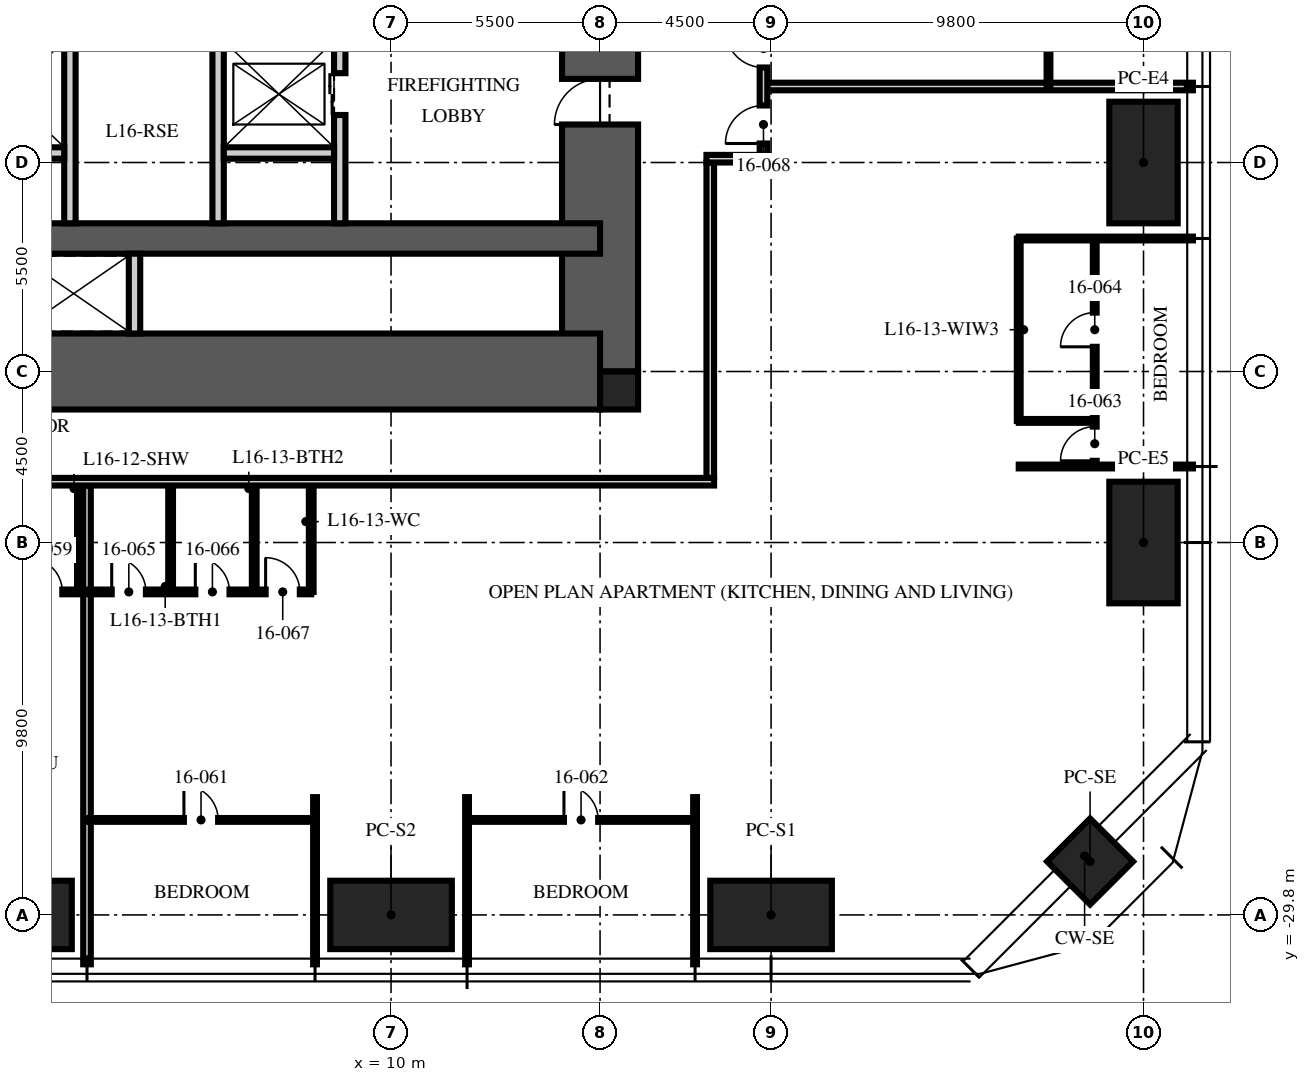
"""IFC4 building model, lengths in metres.
Left out: names, types, materials, properties, quantities, classifications, styles, units other than length and angle.
Written with IfcOpenShell. Run it as: python <this file> out.ifc"""

import sys

from ifc_helpers import new_model, si_unit, direction, frame, frame_2d, origin, origin_2d, place, context, subcontext, project, spatial, rectangle, hollow_rectangle, extrude, element, fill, save


model = new_model("IFC4")
c1 = context("Model", 3, precision=1e-05, world=origin(), true_north=direction((0.0, 1.0)))
c2 = subcontext(c1, "Body", "Model", "MODEL_VIEW")
j1 = project(units=[si_unit("LENGTHUNIT", "METRE"), si_unit("PLANEANGLEUNIT", "RADIAN")], contexts=[c1])
p1 = place(None, origin())
s1 = spatial("IfcSite", under=j1, at=p1, CompositionType="ELEMENT")
p2 = place(p1, origin())
s2 = spatial("IfcBuilding", under=s1, at=p2, CompositionType="ELEMENT")
p3 = place(p2, frame((0.0, 0.0, 66.0)))
s3 = spatial("IfcBuildingStorey", under=s2, at=p3, CompositionType="ELEMENT", Elevation=66.0)
p4 = place(p3, frame((15.5, -15.5, -0.25), z_axis=(0.0, 0.0, 1.0), x_axis=(0.0, 1.0, 0.0)))
e1 = element("IfcWall", 1, at=p4, inside=s3, PredefinedType="SHEAR", context=c2, shape_type="SweptSolid", body=[
    extrude(rectangle(XDim=31.0, YDim=2.0, at=frame_2d((15.5, 0.0))), origin(), (0.0, 0.0, 1.0), 3.75),
])
p5 = place(p4, frame((6.5, 0.0, 0.25)))
e2 = element("IfcOpeningElement", 2, at=p5, cuts=e1, PredefinedType="OPENING", context=c2, shape_type="SweptSolid", body=[
    extrude(rectangle(XDim=1.2, YDim=2.1, at=frame_2d((0.6, 1.05))), frame((0.0, 1.01, 0.0), z_axis=(0.0, -1.0, 0.0), x_axis=(1.0, 0.0, 0.0)), (0.0, 0.0, 1.0), 2.02),
])
p6 = place(p4, frame((23.0, 0.0, 0.25)))
e3 = element("IfcOpeningElement", 3, at=p6, cuts=e1, PredefinedType="OPENING", context=c2, shape_type="SweptSolid", body=[
    extrude(rectangle(XDim=1.8, YDim=2.1, at=frame_2d((0.9, 1.05))), frame((0.0, 1.01, 0.0), z_axis=(0.0, -1.0, 0.0), x_axis=(1.0, 0.0, 0.0)), (0.0, 0.0, 1.0), 2.02),
])
p7 = place(p3, frame((-15.5, -15.5, -0.25), z_axis=(0.0, 0.0, 1.0), x_axis=(1.0, 0.0, 0.0)))
e4 = element("IfcWall", 4, at=p7, inside=s3, PredefinedType="SHEAR", context=c2, shape_type="SweptSolid", body=[
    extrude(rectangle(XDim=31.0, YDim=2.0, at=frame_2d((15.5, 0.0))), origin(), (0.0, 0.0, 1.0), 3.75),
])
p8 = place(p3, frame((-15.5, -12.0, -0.25), z_axis=(0.0, 0.0, 1.0), x_axis=(1.0, 0.0, 0.0)))
e5 = element("IfcWall", 5, at=p8, inside=s3, PredefinedType="SHEAR", context=c2, shape_type="SweptSolid", body=[
    extrude(rectangle(XDim=31.0, YDim=0.8, at=frame_2d((15.5, 0.0))), origin(), (0.0, 0.0, 1.0), 3.75),
])
p9 = place(p3, frame((16.0, -16.0, -0.25), z_axis=(0.0, 0.0, 1.0), x_axis=(1.0, 0.0, 0.0)))
e6 = element("IfcColumn", 6, at=p9, inside=s3, PredefinedType="COLUMN", context=c2, shape_type="SweptSolid", body=[
    extrude(rectangle(XDim=1.0, YDim=1.0, at=origin_2d()), origin(), (0.0, 0.0, 1.0), 3.75),
])
for number, where, z_axis, x_axis in (
    (7, (29.8, -10.0, 0.0), (0.0, 0.0, 1.0), (0.0, 1.0, 0.0)),
    (8, (29.8, -20.0, 0.0), (0.0, 0.0, 1.0), (0.0, 1.0, 0.0)),
    (9, (20.0, -29.8, 0.0), (0.0, 0.0, 1.0), (1.0, 0.0, 0.0)),
    (10, (10.0, -29.8, 0.0), (0.0, 0.0, 1.0), (1.0, 0.0, 0.0)),
    (11, (0.0, -29.8, 0.0), (0.0, 0.0, 1.0), (1.0, 0.0, 0.0)),
):
    element("IfcColumn", number, at=place(p3, frame(where, z_axis=z_axis, x_axis=x_axis)), inside=s3, PredefinedType="COLUMN", context=c2, shape_type="SweptSolid", body=[
        extrude(hollow_rectangle(XDim=3.2, YDim=1.8, WallThickness=0.2, at=origin_2d()), origin(), (0.0, 0.0, 1.0), 3.75),
    ])
p10 = place(p3, frame((28.394, -28.394, 0.0), z_axis=(0.0, 0.0, 1.0), x_axis=(0.707106781187, 0.707106781187, 0.0)))
e12 = element("IfcColumn", 12, at=p10, inside=s3, PredefinedType="COLUMN", context=c2, shape_type="SweptSolid", body=[
    extrude(hollow_rectangle(XDim=1.6, YDim=1.6, WallThickness=0.1, at=origin_2d()), origin(), (0.0, 0.0, 1.0), 3.75),
])
p11 = place(p3, frame((8.65, -11.6, 0.0), z_axis=(0.0, 0.0, 1.0), x_axis=(0.0, 1.0, 0.0)))
e13 = element("IfcWall", 13, at=p11, inside=s3, PredefinedType="PARTITIONING", context=c2, shape_type="SweptSolid", body=[
    extrude(rectangle(XDim=6.7, YDim=0.3, at=frame_2d((3.35, 0.0))), origin(), (0.0, 0.0, 1.0), 3.5),
])
p12 = place(p11, frame((2.85, 0.0, 0.0)))
e14 = element("IfcOpeningElement", 14, at=p12, cuts=e13, PredefinedType="OPENING", context=c2, shape_type="SweptSolid", body=[
    extrude(rectangle(XDim=1.1, YDim=2.1, at=frame_2d((0.55, 1.05))), frame((0.0, 0.16, 0.0), z_axis=(0.0, -1.0, 0.0), x_axis=(1.0, 0.0, 0.0)), (0.0, 0.0, 1.0), 0.32),
])
for number, where, z_axis, x_axis in (
    (15, (1.55, -11.6, 0.0), (0.0, 0.0, 1.0), (0.0, 1.0, 0.0)),
    (16, (5.45, -11.6, 0.0), (0.0, 0.0, 1.0), (0.0, 1.0, 0.0)),
):
    element("IfcWall", number, at=place(p3, frame(where, z_axis=z_axis, x_axis=x_axis)), inside=s3, PredefinedType="PARTITIONING", context=c2, shape_type="SweptSolid", body=[
        extrude(rectangle(XDim=4.8, YDim=0.3, at=frame_2d((2.4, 0.0))), origin(), (0.0, 0.0, 1.0), 3.5),
    ])
for number, where, z_axis, x_axis in (
    (17, (-1.5, -9.75, 0.0), (0.0, 0.0, 1.0), (1.0, 0.0, 0.0)),
    (18, (5.6, -9.75, 0.0), (0.0, 0.0, 1.0), (1.0, 0.0, 0.0)),
):
    element("IfcWall", number, at=place(p3, frame(where, z_axis=z_axis, x_axis=x_axis)), inside=s3, PredefinedType="PARTITIONING", context=c2, shape_type="SweptSolid", body=[
        extrude(rectangle(XDim=2.9, YDim=0.3, at=frame_2d((1.45, 0.0))), origin(), (0.0, 0.0, 1.0), 3.5),
    ])
p13 = place(p3, frame((3.25, -14.5, 0.0), z_axis=(0.0, 0.0, 1.0), x_axis=(0.0, 1.0, 0.0)))
e19 = element("IfcWall", 19, at=p13, inside=s3, PredefinedType="PARTITIONING", context=c2, shape_type="SweptSolid", body=[
    extrude(rectangle(XDim=2.1, YDim=0.3, at=frame_2d((1.05, 0.0))), origin(), (0.0, 0.0, 1.0), 3.5),
])
p14 = place(p3, frame((19.9, -8.0, 0.0), z_axis=(0.0, 0.0, 1.0), x_axis=(1.0, 0.0, 0.0)))
e20 = element("IfcWall", 20, at=p14, inside=s3, PredefinedType="PARTITIONING", context=c2, shape_type="SweptSolid", body=[
    extrude(rectangle(XDim=11.2, YDim=0.2, at=frame_2d((5.6, 0.0))), origin(), (0.0, 0.0, 1.0), 2.71),
])
p15 = place(p3, frame((2.0, -18.5, 0.0), z_axis=(0.0, 0.0, 1.0), x_axis=(0.0, -1.0, 0.0)))
e21 = element("IfcWall", 21, at=p15, inside=s3, PredefinedType="PARTITIONING", context=c2, shape_type="SweptSolid", body=[
    extrude(rectangle(XDim=12.6, YDim=0.2, at=frame_2d((6.3, 0.0))), origin(), (0.0, 0.0, 1.0), 2.71),
])
for number, where, z_axis, x_axis in (
    (22, (8.0, -26.7, 0.0), (0.0, 0.0, 1.0), (0.0, -1.0, 0.0)),
    (23, (12.0, -26.7, 0.0), (0.0, 0.0, 1.0), (0.0, -1.0, 0.0)),
    (24, (18.0, -26.7, 0.0), (0.0, 0.0, 1.0), (0.0, -1.0, 0.0)),
):
    element("IfcWall", number, at=place(p3, frame(where, z_axis=z_axis, x_axis=x_axis)), inside=s3, PredefinedType="PARTITIONING", context=c2, shape_type="SweptSolid", body=[
        extrude(rectangle(XDim=4.4, YDim=0.1, at=frame_2d((2.2, 0.0))), origin(), (0.0, 0.0, 1.0), 2.71),
    ])
for number, where, z_axis, x_axis in (
    (25, (26.517, -18.0, 0.0), (0.0, 0.0, 1.0), (1.0, 0.0, 0.0)),
    (26, (26.517, -12.0, 0.0), (0.0, 0.0, 1.0), (1.0, 0.0, 0.0)),
):
    element("IfcWall", number, at=place(p3, frame(where, z_axis=z_axis, x_axis=x_axis)), inside=s3, PredefinedType="PARTITIONING", context=c2, shape_type="SweptSolid", body=[
        extrude(rectangle(XDim=4.583, YDim=0.1, at=frame_2d((2.292, 0.0))), origin(), (0.0, 0.0, 1.0), 2.71),
    ])
p16 = place(p3, frame((27.3, -8.0, 0.0), z_axis=(0.0, 0.0, 1.0), x_axis=(0.0, 1.0, 0.0)))
e27 = element("IfcWall", 27, at=p16, inside=s3, PredefinedType="PARTITIONING", context=c2, shape_type="SweptSolid", body=[
    extrude(rectangle(XDim=6.0, YDim=0.1, at=frame_2d((3.0, 0.0))), origin(), (0.0, 0.0, 1.0), 2.61),
])
p17 = place(p16, frame((2.55, 0.0, 0.0)))
e28 = element("IfcOpeningElement", 28, at=p17, cuts=e27, PredefinedType="OPENING", context=c2, shape_type="SweptSolid", body=[
    extrude(rectangle(XDim=0.9, YDim=2.1, at=frame_2d((0.45, 1.05))), frame((0.0, 0.06, 0.0), z_axis=(0.0, -1.0, 0.0), x_axis=(1.0, 0.0, 0.0)), (0.0, 0.0, 1.0), 0.12),
])
p18 = place(p3, frame((0.0, -21.3, 0.0), z_axis=(0.0, 0.0, 1.0), x_axis=(1.0, 0.0, 0.0)))
e29 = element("IfcWall", 29, at=p18, inside=s3, PredefinedType="PARTITIONING", context=c2, shape_type="SweptSolid", body=[
    extrude(rectangle(XDim=1.8, YDim=0.125, at=frame_2d((0.9, 0.0))), origin(), (0.0, 0.0, 1.0), 2.492),
])
p19 = place(p18, frame((0.45, 0.0, 0.0)))
e30 = element("IfcOpeningElement", 30, at=p19, cuts=e29, PredefinedType="OPENING", context=c2, shape_type="SweptSolid", body=[
    extrude(rectangle(XDim=0.9, YDim=2.1, at=frame_2d((0.45, 1.05))), frame((0.0, 0.073, 0.0), z_axis=(0.0, -1.0, 0.0), x_axis=(1.0, 0.0, 0.0)), (0.0, 0.0, 1.0), 0.145),
])
p20 = place(p3, frame((1.8, -18.5, 0.0), z_axis=(0.0, 0.0, 1.0), x_axis=(0.0, -1.0, 0.0)))
e31 = element("IfcWall", 31, at=p20, inside=s3, PredefinedType="PARTITIONING", context=c2, shape_type="SweptSolid", body=[
    extrude(rectangle(XDim=2.8, YDim=0.125, at=frame_2d((1.4, 0.0))), origin(), (0.0, 0.0, 1.0), 3.5),
])
p21 = place(p3, frame((2.0, -27.3, 0.0), z_axis=(0.0, 0.0, 1.0), x_axis=(1.0, 0.0, 0.0)))
e32 = element("IfcWall", 32, at=p21, inside=s3, PredefinedType="PARTITIONING", context=c2, shape_type="SweptSolid", body=[
    extrude(rectangle(XDim=6.0, YDim=0.1, at=frame_2d((3.0, 0.0))), origin(), (0.0, 0.0, 1.0), 2.61),
])
p22 = place(p21, frame((2.55, 0.0, 0.0)))
e33 = element("IfcOpeningElement", 33, at=p22, cuts=e32, PredefinedType="OPENING", context=c2, shape_type="SweptSolid", body=[
    extrude(rectangle(XDim=0.9, YDim=2.1, at=frame_2d((0.45, 1.05))), frame((0.0, 0.06, 0.0), z_axis=(0.0, -1.0, 0.0), x_axis=(1.0, 0.0, 0.0)), (0.0, 0.0, 1.0), 0.12),
])
p23 = place(p3, frame((12.0, -27.3, 0.0), z_axis=(0.0, 0.0, 1.0), x_axis=(1.0, 0.0, 0.0)))
e34 = element("IfcWall", 34, at=p23, inside=s3, PredefinedType="PARTITIONING", context=c2, shape_type="SweptSolid", body=[
    extrude(rectangle(XDim=6.0, YDim=0.1, at=frame_2d((3.0, 0.0))), origin(), (0.0, 0.0, 1.0), 2.61),
])
p24 = place(p23, frame((2.55, 0.0, 0.0)))
e35 = element("IfcOpeningElement", 35, at=p24, cuts=e34, PredefinedType="OPENING", context=c2, shape_type="SweptSolid", body=[
    extrude(rectangle(XDim=0.9, YDim=2.1, at=frame_2d((0.45, 1.05))), frame((0.0, 0.06, 0.0), z_axis=(0.0, -1.0, 0.0), x_axis=(1.0, 0.0, 0.0)), (0.0, 0.0, 1.0), 0.12),
])
p25 = place(p3, frame((28.517, -18.0, 0.0), z_axis=(0.0, 0.0, 1.0), x_axis=(0.0, 1.0, 0.0)))
e36 = element("IfcWall", 36, at=p25, inside=s3, PredefinedType="PARTITIONING", context=c2, shape_type="SweptSolid", body=[
    extrude(rectangle(XDim=6.0, YDim=0.1, at=frame_2d((3.0, 0.0))), origin(), (0.0, 0.0, 1.0), 2.61),
])
p26 = place(p25, frame((0.15, 0.0, 0.0)))
e37 = element("IfcOpeningElement", 37, at=p26, cuts=e36, PredefinedType="OPENING", context=c2, shape_type="SweptSolid", body=[
    extrude(rectangle(XDim=0.9, YDim=2.1, at=frame_2d((0.45, 1.05))), frame((0.0, 0.06, 0.0), z_axis=(0.0, -1.0, 0.0), x_axis=(1.0, 0.0, 0.0)), (0.0, 0.0, 1.0), 0.12),
])
p27 = place(p25, frame((3.15, 0.0, 0.0)))
e38 = element("IfcOpeningElement", 38, at=p27, cuts=e36, PredefinedType="OPENING", context=c2, shape_type="SweptSolid", body=[
    extrude(rectangle(XDim=0.9, YDim=2.1, at=frame_2d((0.45, 1.05))), frame((0.0, 0.06, 0.0), z_axis=(0.0, -1.0, 0.0), x_axis=(1.0, 0.0, 0.0)), (0.0, 0.0, 1.0), 0.12),
])
p28 = place(p3, frame((26.517, -16.8, 0.0), z_axis=(0.0, 0.0, 1.0), x_axis=(1.0, 0.0, 0.0)))
e39 = element("IfcWall", 39, at=p28, inside=s3, PredefinedType="PARTITIONING", context=c2, shape_type="SweptSolid", body=[
    extrude(rectangle(XDim=2.0, YDim=0.1, at=frame_2d((1.0, 0.0))), origin(), (0.0, 0.0, 1.0), 3.5),
])
p29 = place(p3, frame((26.517, -16.8, 0.0), z_axis=(0.0, 0.0, 1.0), x_axis=(0.0, 1.0, 0.0)))
e40 = element("IfcWall", 40, at=p29, inside=s3, PredefinedType="PARTITIONING", context=c2, shape_type="SweptSolid", body=[
    extrude(rectangle(XDim=4.8, YDim=0.1, at=frame_2d((2.4, 0.0))), origin(), (0.0, 0.0, 1.0), 2.61),
])
p30 = place(p3, frame((2.0, -21.3, 0.0), z_axis=(0.0, 0.0, 1.0), x_axis=(1.0, 0.0, 0.0)))
e41 = element("IfcWall", 41, at=p30, inside=s3, PredefinedType="PARTITIONING", context=c2, shape_type="SweptSolid", body=[
    extrude(rectangle(XDim=5.9, YDim=0.125, at=frame_2d((2.95, 0.0))), origin(), (0.0, 0.0, 1.0), 2.61),
])
p31 = place(p30, frame((0.65, 0.0, 0.0)))
e42 = element("IfcOpeningElement", 42, at=p31, cuts=e41, PredefinedType="OPENING", context=c2, shape_type="SweptSolid", body=[
    extrude(rectangle(XDim=0.9, YDim=2.1, at=frame_2d((0.45, 1.05))), frame((0.0, 0.073, 0.0), z_axis=(0.0, -1.0, 0.0), x_axis=(1.0, 0.0, 0.0)), (0.0, 0.0, 1.0), 0.145),
])
p32 = place(p30, frame((2.85, 0.0, 0.0)))
e43 = element("IfcOpeningElement", 43, at=p32, cuts=e41, PredefinedType="OPENING", context=c2, shape_type="SweptSolid", body=[
    extrude(rectangle(XDim=0.9, YDim=2.1, at=frame_2d((0.45, 1.05))), frame((0.0, 0.073, 0.0), z_axis=(0.0, -1.0, 0.0), x_axis=(1.0, 0.0, 0.0)), (0.0, 0.0, 1.0), 0.145),
])
p33 = place(p30, frame((4.7, 0.0, 0.0)))
e44 = element("IfcOpeningElement", 44, at=p33, cuts=e41, PredefinedType="OPENING", context=c2, shape_type="SweptSolid", body=[
    extrude(rectangle(XDim=0.9, YDim=2.1, at=frame_2d((0.45, 1.05))), frame((0.0, 0.073, 0.0), z_axis=(0.0, -1.0, 0.0), x_axis=(1.0, 0.0, 0.0)), (0.0, 0.0, 1.0), 0.145),
])
for number, where, z_axis, x_axis in (
    (45, (4.2, -18.5, 0.0), (0.0, 0.0, 1.0), (0.0, -1.0, 0.0)),
    (46, (6.4, -18.5, 0.0), (0.0, 0.0, 1.0), (0.0, -1.0, 0.0)),
    (47, (7.9, -18.5, 0.0), (0.0, 0.0, 1.0), (0.0, -1.0, 0.0)),
):
    element("IfcWall", number, at=place(p3, frame(where, z_axis=z_axis, x_axis=x_axis)), inside=s3, PredefinedType="PARTITIONING", context=c2, shape_type="SweptSolid", body=[
        extrude(rectangle(XDim=2.8, YDim=0.125, at=frame_2d((1.4, 0.0))), origin(), (0.0, 0.0, 1.0), 3.5),
    ])
p34 = place(p3, frame((18.4, -18.3, 0.0), z_axis=(0.0, 0.0, 1.0), x_axis=(0.0, 1.0, 0.0)))
e48 = element("IfcWall", 48, at=p34, inside=s3, PredefinedType="PARTITIONING", context=c2, shape_type="SweptSolid", body=[
    extrude(rectangle(XDim=8.3, YDim=0.2, at=frame_2d((4.15, 0.0))), origin(), (0.0, 0.0, 1.0), 2.3),
])
p35 = place(p3, frame((18.3, -9.9, 0.0), z_axis=(0.0, 0.0, 1.0), x_axis=(1.0, 0.0, 0.0)))
e49 = element("IfcWall", 49, at=p35, inside=s3, PredefinedType="PARTITIONING", context=c2, shape_type="SweptSolid", body=[
    extrude(rectangle(XDim=1.6, YDim=0.2, at=frame_2d((0.8, 0.0))), origin(), (0.0, 0.0, 1.0), 2.492),
])
p36 = place(p3, frame((19.8, -9.8, 0.0), z_axis=(0.0, 0.0, 1.0), x_axis=(0.0, 1.0, 0.0)))
e50 = element("IfcWall", 50, at=p36, inside=s3, PredefinedType="PARTITIONING", context=c2, shape_type="SweptSolid", body=[
    extrude(rectangle(XDim=3.6, YDim=0.2, at=frame_2d((1.8, 0.0))), origin(), (0.0, 0.0, 1.0), 3.5),
])
p37 = place(p36, frame((2.3, 0.0, 0.0)))
e51 = element("IfcOpeningElement", 51, at=p37, cuts=e50, PredefinedType="OPENING", context=c2, shape_type="SweptSolid", body=[
    extrude(rectangle(XDim=1.0, YDim=2.2, at=frame_2d((0.5, 1.1))), frame((0.0, 0.11, 0.0), z_axis=(0.0, -1.0, 0.0), x_axis=(1.0, 0.0, 0.0)), (0.0, 0.0, 1.0), 0.22),
])
p38 = place(p36, frame((0.3, 0.0, 0.0)))
e52 = element("IfcOpeningElement", 52, at=p38, cuts=e50, PredefinedType="OPENING", context=c2, shape_type="SweptSolid", body=[
    extrude(rectangle(XDim=1.0, YDim=2.2, at=frame_2d((0.5, 1.1))), frame((0.0, 0.11, 0.0), z_axis=(0.0, -1.0, 0.0), x_axis=(1.0, 0.0, 0.0)), (0.0, 0.0, 1.0), 0.22),
])
p39 = place(p3, frame((18.5, -18.4, 0.0), z_axis=(0.0, 0.0, 1.0), x_axis=(-1.0, 0.0, 0.0)))
e53 = element("IfcWall", 53, at=p39, inside=s3, PredefinedType="PARTITIONING", context=c2, shape_type="SweptSolid", body=[
    extrude(rectangle(XDim=18.5, YDim=0.2, at=frame_2d((9.25, 0.0))), origin(), (0.0, 0.0, 1.0), 2.3),
])
p40 = place(p5, origin())
e54 = element("IfcDoor", 54, at=p40, inside=s3, OperationType="SINGLE_SWING_LEFT", PredefinedType="DOOR", context=c2, shape_type="SweptSolid", body=[
    extrude(rectangle(XDim=1.2, YDim=2.1, at=frame_2d((0.6, 1.05))), frame((0.0, 0.025, 0.0), z_axis=(0.0, -1.0, 0.0), x_axis=(1.0, 0.0, 0.0)), (0.0, 0.0, 1.0), 0.05),
])
fill(e2, e54)
p41 = place(p12, origin())
e55 = element("IfcDoor", 55, at=p41, inside=s3, OperationType="DOUBLE_DOOR_SLIDING", PredefinedType="DOOR", context=c2, shape_type="SweptSolid", body=[
    extrude(rectangle(XDim=1.1, YDim=2.1, at=frame_2d((0.55, 1.05))), frame((0.0, 0.025, 0.0), z_axis=(0.0, -1.0, 0.0), x_axis=(1.0, 0.0, 0.0)), (0.0, 0.0, 1.0), 0.05),
])
fill(e14, e55)
p42 = place(p37, origin())
e56 = element("IfcDoor", 56, at=p42, inside=s3, OperationType="SINGLE_SWING_RIGHT", PredefinedType="DOOR", context=c2, shape_type="SweptSolid", body=[
    extrude(rectangle(XDim=1.0, YDim=2.2, at=frame_2d((0.5, 1.1))), frame((0.0, 0.025, 0.0), z_axis=(0.0, -1.0, 0.0), x_axis=(1.0, 0.0, 0.0)), (0.0, 0.0, 1.0), 0.05),
])
fill(e51, e56)
p43 = place(p19, origin())
e57 = element("IfcDoor", 57, at=p43, inside=s3, OperationType="SINGLE_SWING_LEFT", PredefinedType="DOOR", context=c2, shape_type="SweptSolid", body=[
    extrude(rectangle(XDim=0.9, YDim=2.1, at=frame_2d((0.45, 1.05))), frame((0.0, 0.025, 0.0), z_axis=(0.0, -1.0, 0.0), x_axis=(1.0, 0.0, 0.0)), (0.0, 0.0, 1.0), 0.05),
])
fill(e30, e57)
p44 = place(p22, origin())
e58 = element("IfcDoor", 58, at=p44, inside=s3, OperationType="SINGLE_SWING_LEFT", PredefinedType="DOOR", context=c2, shape_type="SweptSolid", body=[
    extrude(rectangle(XDim=0.9, YDim=2.1, at=frame_2d((0.45, 1.05))), frame((0.0, 0.025, 0.0), z_axis=(0.0, -1.0, 0.0), x_axis=(1.0, 0.0, 0.0)), (0.0, 0.0, 1.0), 0.05),
])
fill(e33, e58)
p45 = place(p24, origin())
e59 = element("IfcDoor", 59, at=p45, inside=s3, OperationType="SINGLE_SWING_LEFT", PredefinedType="DOOR", context=c2, shape_type="SweptSolid", body=[
    extrude(rectangle(XDim=0.9, YDim=2.1, at=frame_2d((0.45, 1.05))), frame((0.0, 0.025, 0.0), z_axis=(0.0, -1.0, 0.0), x_axis=(1.0, 0.0, 0.0)), (0.0, 0.0, 1.0), 0.05),
])
fill(e35, e59)
p46 = place(p26, origin())
e60 = element("IfcDoor", 60, at=p46, inside=s3, OperationType="SINGLE_SWING_LEFT", PredefinedType="DOOR", context=c2, shape_type="SweptSolid", body=[
    extrude(rectangle(XDim=0.9, YDim=2.1, at=frame_2d((0.45, 1.05))), frame((0.0, 0.025, 0.0), z_axis=(0.0, -1.0, 0.0), x_axis=(1.0, 0.0, 0.0)), (0.0, 0.0, 1.0), 0.05),
])
fill(e37, e60)
p47 = place(p27, origin())
e61 = element("IfcDoor", 61, at=p47, inside=s3, OperationType="SINGLE_SWING_LEFT", PredefinedType="DOOR", context=c2, shape_type="SweptSolid", body=[
    extrude(rectangle(XDim=0.9, YDim=2.1, at=frame_2d((0.45, 1.05))), frame((0.0, 0.025, 0.0), z_axis=(0.0, -1.0, 0.0), x_axis=(1.0, 0.0, 0.0)), (0.0, 0.0, 1.0), 0.05),
])
fill(e38, e61)
p48 = place(p31, origin())
e62 = element("IfcDoor", 62, at=p48, inside=s3, OperationType="SINGLE_SWING_LEFT", PredefinedType="DOOR", context=c2, shape_type="SweptSolid", body=[
    extrude(rectangle(XDim=0.9, YDim=2.1, at=frame_2d((0.45, 1.05))), frame((0.0, 0.025, 0.0), z_axis=(0.0, -1.0, 0.0), x_axis=(1.0, 0.0, 0.0)), (0.0, 0.0, 1.0), 0.05),
])
fill(e42, e62)
p49 = place(p32, origin())
e63 = element("IfcDoor", 63, at=p49, inside=s3, OperationType="SINGLE_SWING_LEFT", PredefinedType="DOOR", context=c2, shape_type="SweptSolid", body=[
    extrude(rectangle(XDim=0.9, YDim=2.1, at=frame_2d((0.45, 1.05))), frame((0.0, 0.025, 0.0), z_axis=(0.0, -1.0, 0.0), x_axis=(1.0, 0.0, 0.0)), (0.0, 0.0, 1.0), 0.05),
])
fill(e43, e63)
p50 = place(p33, origin())
e64 = element("IfcDoor", 64, at=p50, inside=s3, OperationType="SINGLE_SWING_LEFT", PredefinedType="DOOR", context=c2, shape_type="SweptSolid", body=[
    extrude(rectangle(XDim=0.9, YDim=2.1, at=frame_2d((0.45, 1.05))), frame((0.0, 0.025, 0.0), z_axis=(0.0, -1.0, 0.0), x_axis=(1.0, 0.0, 0.0)), (0.0, 0.0, 1.0), 0.05),
])
fill(e44, e64)
p51 = place(p38, origin())
e65 = element("IfcDoor", 65, at=p51, inside=s3, OperationType="SINGLE_SWING_LEFT", PredefinedType="DOOR", context=c2, shape_type="SweptSolid", body=[
    extrude(rectangle(XDim=1.0, YDim=2.2, at=frame_2d((0.5, 1.1))), frame((0.0, 0.025, 0.0), z_axis=(0.0, -1.0, 0.0), x_axis=(1.0, 0.0, 0.0)), (0.0, 0.0, 1.0), 0.05),
])
fill(e52, e65)
save(model, sys.argv[1])
